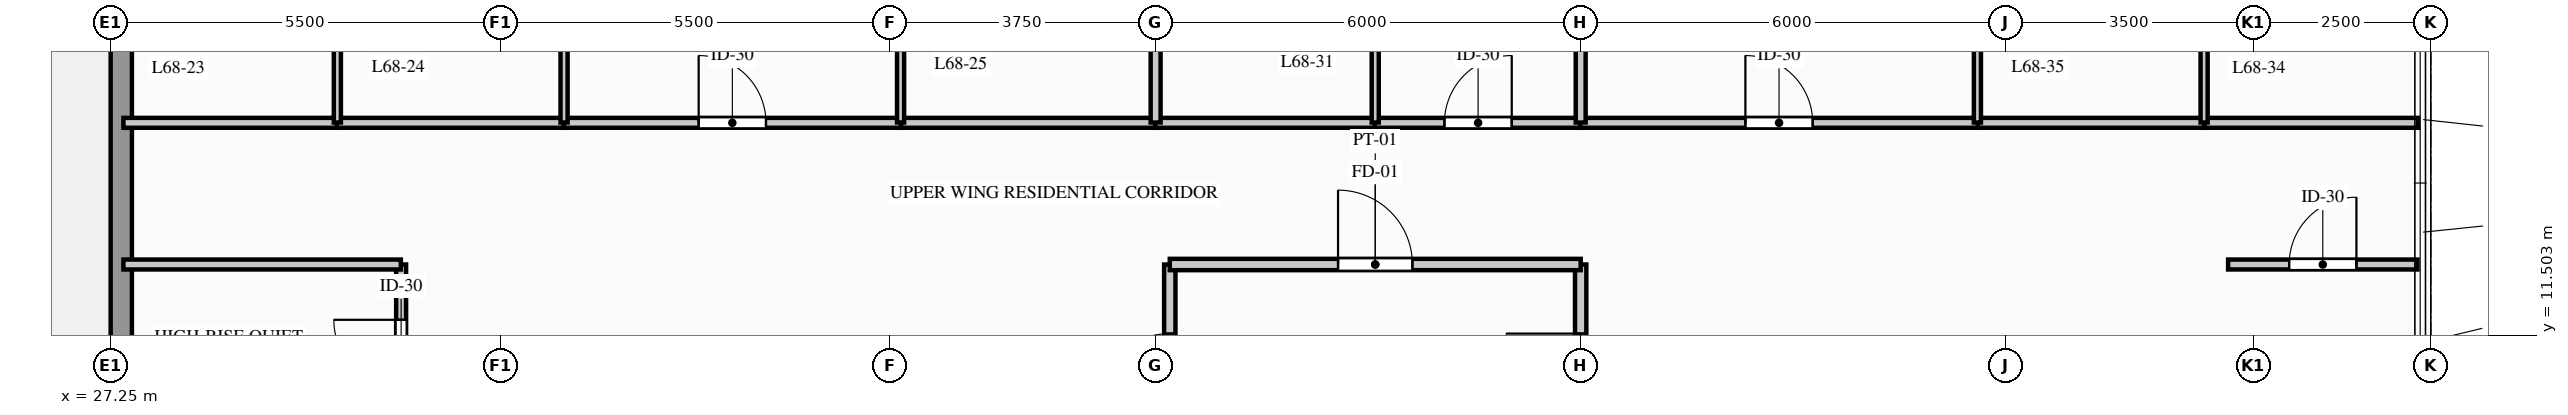
"""IFC4 building model, lengths in metres.
Left out: names, types, materials, properties, quantities, classifications, styles, units other than length and angle.
Written with IfcOpenShell. Run it as: python <this file> out.ifc"""

import sys

from ifc_helpers import new_model, si_unit, direction, frame, frame_2d, origin, place, context, subcontext, project, spatial, rectangle, extrude, element, fill, save


model = new_model("IFC4")
c1 = context("Model", 3, precision=1e-05, world=origin(), true_north=direction((0.0, 1.0)))
c2 = subcontext(c1, "Body", "Model", "MODEL_VIEW")
j1 = project(units=[si_unit("LENGTHUNIT", "METRE"), si_unit("PLANEANGLEUNIT", "RADIAN")], contexts=[c1])
p1 = place(None, origin())
s1 = spatial("IfcSite", under=j1, at=p1, CompositionType="ELEMENT")
p2 = place(p1, origin())
s2 = spatial("IfcBuilding", under=s1, at=p2, CompositionType="ELEMENT")
p3 = place(p2, frame((0.0, 0.0, 224.2)))
s3 = spatial("IfcBuildingStorey", under=s2, at=p3, CompositionType="ELEMENT", Elevation=224.2)
p4 = place(p3, frame((27.4, 24.0, 0.0), z_axis=(0.0, 0.0, 1.0), x_axis=(0.0, -1.0, 0.0)))
e1 = element("IfcWall", 1, at=p4, inside=s3, PredefinedType="STANDARD", context=c2, shape_type="SweptSolid", body=[
    extrude(rectangle(XDim=21.5, YDim=0.3, at=frame_2d((10.75, 0.0))), origin(), (0.0, 0.0, 1.0), 2.332),
])
p5 = place(p4, frame((5.5, 0.0, 0.0)))
e2 = element("IfcOpeningElement", 2, at=p5, cuts=e1, PredefinedType="OPENING", context=c2, shape_type="SweptSolid", body=[
    extrude(rectangle(XDim=1.1, YDim=2.2, at=frame_2d((0.55, 1.1))), frame((0.0, 0.16, 0.0), z_axis=(0.0, -1.0, 0.0), x_axis=(1.0, 0.0, 0.0)), (0.0, 0.0, 1.0), 0.32),
])
p6 = place(p4, frame((2.43, 0.0, 0.312)))
e3 = element("IfcOpeningElement", 3, at=p6, cuts=e1, PredefinedType="OPENING", context=c2, shape_type="SweptSolid", body=[
    extrude(rectangle(XDim=1.5, YDim=1.8, at=frame_2d((0.75, 0.9))), frame((0.0, 0.16, 0.0), z_axis=(0.0, -1.0, 0.0), x_axis=(1.0, 0.0, 0.0)), (0.0, 0.0, 1.0), 0.32),
])
p7 = place(p3, frame((31.35, 9.989, 0.0), z_axis=(0.0, 0.0, 1.0), x_axis=(0.0, 1.0, 0.0)))
e4 = element("IfcWall", 4, at=p7, inside=s3, PredefinedType="PARTITIONING", context=c2, shape_type="SweptSolid", body=[
    extrude(rectangle(XDim=2.511, YDim=0.14, at=frame_2d((1.256, 0.0))), origin(), (0.0, 0.0, 1.0), 2.325),
])
p8 = place(p7, frame((0.781, 0.0, 0.0)))
e5 = element("IfcOpeningElement", 5, at=p8, cuts=e4, PredefinedType="OPENING", context=c2, shape_type="SweptSolid", body=[
    extrude(rectangle(XDim=0.95, YDim=2.05, at=frame_2d((0.475, 1.025))), frame((0.0, 0.08, 0.0), z_axis=(0.0, -1.0, 0.0), x_axis=(1.0, 0.0, 0.0)), (0.0, 0.0, 1.0), 0.16),
])
p9 = place(p3, frame((42.2, 9.5, 0.0), z_axis=(0.0, 0.0, 1.0), x_axis=(0.0, 1.0, 0.0)))
e6 = element("IfcWall", 6, at=p9, inside=s3, PredefinedType="PARTITIONING", context=c2, shape_type="SweptSolid", body=[
    extrude(rectangle(XDim=3.0, YDim=0.16, at=frame_2d((1.5, 0.0))), origin(), (0.0, 0.0, 1.0), 2.325),
])
p10 = place(p9, frame((0.975, 0.0, 0.0)))
e7 = element("IfcOpeningElement", 7, at=p10, cuts=e6, PredefinedType="OPENING", context=c2, shape_type="SweptSolid", body=[
    extrude(rectangle(XDim=1.05, YDim=2.06, at=frame_2d((0.525, 1.03))), frame((0.0, 0.09, 0.0), z_axis=(0.0, -1.0, 0.0), x_axis=(1.0, 0.0, 0.0)), (0.0, 0.0, 1.0), 0.18),
])
p11 = place(p3, frame((48.0, 9.5, 0.0), z_axis=(0.0, 0.0, 1.0), x_axis=(0.0, 1.0, 0.0)))
e8 = element("IfcWall", 8, at=p11, inside=s3, PredefinedType="PARTITIONING", context=c2, shape_type="SweptSolid", body=[
    extrude(rectangle(XDim=3.0, YDim=0.16, at=frame_2d((1.5, 0.0))), origin(), (0.0, 0.0, 1.0), 2.325),
])
p12 = place(p11, frame((0.975, 0.0, 0.0)))
e9 = element("IfcOpeningElement", 9, at=p12, cuts=e8, PredefinedType="OPENING", context=c2, shape_type="SweptSolid", body=[
    extrude(rectangle(XDim=1.05, YDim=2.06, at=frame_2d((0.525, 1.03))), frame((0.0, 0.09, 0.0), z_axis=(0.0, -1.0, 0.0), x_axis=(1.0, 0.0, 0.0)), (0.0, 0.0, 1.0), 0.18),
])
p13 = place(p3, frame((42.2, 12.5, 0.0), z_axis=(0.0, 0.0, 1.0), x_axis=(1.0, 0.0, 0.0)))
e10 = element("IfcWall", 10, at=p13, inside=s3, PredefinedType="PARTITIONING", context=c2, shape_type="SweptSolid", body=[
    extrude(rectangle(XDim=5.8, YDim=0.16, at=frame_2d((2.9, 0.0))), origin(), (0.0, 0.0, 1.0), 2.325),
])
p14 = place(p13, frame((2.375, 0.0, 0.0)))
e11 = element("IfcOpeningElement", 11, at=p14, cuts=e10, PredefinedType="OPENING", context=c2, shape_type="SweptSolid", body=[
    extrude(rectangle(XDim=1.05, YDim=2.06, at=frame_2d((0.525, 1.03))), frame((0.0, 0.09, 0.0), z_axis=(0.0, -1.0, 0.0), x_axis=(1.0, 0.0, 0.0)), (0.0, 0.0, 1.0), 0.18),
])
p15 = place(p3, frame((57.139, 12.5, 0.0), z_axis=(0.0, 0.0, 1.0), x_axis=(1.0, 0.0, 0.0)))
e12 = element("IfcWall", 12, at=p15, inside=s3, PredefinedType="PARTITIONING", context=c2, shape_type="SweptSolid", body=[
    extrude(rectangle(XDim=2.673, YDim=0.14, at=frame_2d((1.336, 0.0))), origin(), (0.0, 0.0, 1.0), 2.89),
])
p16 = place(p15, frame((0.861, 0.0, 0.0)))
e13 = element("IfcOpeningElement", 13, at=p16, cuts=e12, PredefinedType="OPENING", context=c2, shape_type="SweptSolid", body=[
    extrude(rectangle(XDim=0.95, YDim=2.05, at=frame_2d((0.475, 1.025))), frame((0.0, 0.08, 0.0), z_axis=(0.0, -1.0, 0.0), x_axis=(1.0, 0.0, 0.0)), (0.0, 0.0, 1.0), 0.16),
])
p17 = place(p3, frame((27.43, 12.5, 0.0), z_axis=(0.0, 0.0, 1.0), x_axis=(1.0, 0.0, 0.0)))
e14 = element("IfcWall", 14, at=p17, inside=s3, PredefinedType="PARTITIONING", context=c2, shape_type="SweptSolid", body=[
    extrude(rectangle(XDim=3.916, YDim=0.14, at=frame_2d((1.958, 0.0))), origin(), (0.0, 0.0, 1.0), 2.89),
])
p18 = place(p3, frame((27.43, 14.5, 0.0), z_axis=(0.0, 0.0, 1.0), x_axis=(1.0, 0.0, 0.0)))
e15 = element("IfcWall", 15, at=p18, inside=s3, PredefinedType="PARTITIONING", context=c2, shape_type="SweptSolid", body=[
    extrude(rectangle(XDim=3.031, YDim=0.14, at=frame_2d((1.516, 0.0))), origin(), (0.0, 0.0, 1.0), 2.89),
])
p19 = place(p3, frame((30.443, 14.5, 0.0), z_axis=(0.0, 0.0, 1.0), x_axis=(1.0, 0.0, 0.0)))
e16 = element("IfcWall", 16, at=p19, inside=s3, PredefinedType="PARTITIONING", context=c2, shape_type="SweptSolid", body=[
    extrude(rectangle(XDim=3.219, YDim=0.14, at=frame_2d((1.609, 0.0))), origin(), (0.0, 0.0, 1.0), 2.89),
])
p20 = place(p3, frame((38.389, 14.5, 0.0), z_axis=(0.0, 0.0, 1.0), x_axis=(1.0, 0.0, 0.0)))
e17 = element("IfcWall", 17, at=p20, inside=s3, PredefinedType="PARTITIONING", context=c2, shape_type="SweptSolid", body=[
    extrude(rectangle(XDim=3.623, YDim=0.14, at=frame_2d((1.811, 0.0))), origin(), (0.0, 0.0, 1.0), 2.325),
])
p21 = place(p3, frame((33.643, 14.5, 0.0), z_axis=(0.0, 0.0, 1.0), x_axis=(1.0, 0.0, 0.0)))
e18 = element("IfcWall", 18, at=p21, inside=s3, PredefinedType="PARTITIONING", context=c2, shape_type="SweptSolid", body=[
    extrude(rectangle(XDim=4.765, YDim=0.14, at=frame_2d((2.382, 0.0))), origin(), (0.0, 0.0, 1.0), 2.325),
])
p22 = place(p21, frame((1.907, 0.0, 0.0)))
e19 = element("IfcOpeningElement", 19, at=p22, cuts=e18, PredefinedType="OPENING", context=c2, shape_type="SweptSolid", body=[
    extrude(rectangle(XDim=0.95, YDim=2.05, at=frame_2d((0.475, 1.025))), frame((0.0, 0.08, 0.0), z_axis=(0.0, -1.0, 0.0), x_axis=(1.0, 0.0, 0.0)), (0.0, 0.0, 1.0), 0.16),
])
p23 = place(p3, frame((41.993, 14.5, 0.0), z_axis=(0.0, 0.0, 1.0), x_axis=(1.0, 0.0, 0.0)))
e20 = element("IfcWall", 20, at=p23, inside=s3, PredefinedType="PARTITIONING", context=c2, shape_type="SweptSolid", body=[
    extrude(rectangle(XDim=3.119, YDim=0.14, at=frame_2d((1.559, 0.0))), origin(), (0.0, 0.0, 1.0), 2.325),
])
p24 = place(p3, frame((45.093, 14.5, 0.0), z_axis=(0.0, 0.0, 1.0), x_axis=(1.0, 0.0, 0.0)))
e21 = element("IfcWall", 21, at=p24, inside=s3, PredefinedType="PARTITIONING", context=c2, shape_type="SweptSolid", body=[
    extrude(rectangle(XDim=2.918, YDim=0.14, at=frame_2d((1.459, 0.0))), origin(), (0.0, 0.0, 1.0), 2.325),
])
p25 = place(p24, frame((0.984, 0.0, 0.0)))
e22 = element("IfcOpeningElement", 22, at=p25, cuts=e21, PredefinedType="OPENING", context=c2, shape_type="SweptSolid", body=[
    extrude(rectangle(XDim=0.95, YDim=2.05, at=frame_2d((0.475, 1.025))), frame((0.0, 0.08, 0.0), z_axis=(0.0, -1.0, 0.0), x_axis=(1.0, 0.0, 0.0)), (0.0, 0.0, 1.0), 0.16),
])
p26 = place(p3, frame((56.789, 14.5, 0.0), z_axis=(0.0, 0.0, 1.0), x_axis=(1.0, 0.0, 0.0)))
e23 = element("IfcWall", 23, at=p26, inside=s3, PredefinedType="PARTITIONING", context=c2, shape_type="SweptSolid", body=[
    extrude(rectangle(XDim=3.031, YDim=0.14, at=frame_2d((1.516, 0.0))), origin(), (0.0, 0.0, 1.0), 2.89),
])
p27 = place(p3, frame((53.589, 14.5, 0.0), z_axis=(0.0, 0.0, 1.0), x_axis=(1.0, 0.0, 0.0)))
e24 = element("IfcWall", 24, at=p27, inside=s3, PredefinedType="PARTITIONING", context=c2, shape_type="SweptSolid", body=[
    extrude(rectangle(XDim=3.219, YDim=0.14, at=frame_2d((1.609, 0.0))), origin(), (0.0, 0.0, 1.0), 2.325),
])
p28 = place(p3, frame((47.993, 14.5, 0.0), z_axis=(0.0, 0.0, 1.0), x_axis=(1.0, 0.0, 0.0)))
e25 = element("IfcWall", 25, at=p28, inside=s3, PredefinedType="PARTITIONING", context=c2, shape_type="SweptSolid", body=[
    extrude(rectangle(XDim=5.615, YDim=0.14, at=frame_2d((2.807, 0.0))), origin(), (0.0, 0.0, 1.0), 2.325),
])
p29 = place(p28, frame((2.332, 0.0, 0.0)))
e26 = element("IfcOpeningElement", 26, at=p29, cuts=e25, PredefinedType="OPENING", context=c2, shape_type="SweptSolid", body=[
    extrude(rectangle(XDim=0.95, YDim=2.05, at=frame_2d((0.475, 1.025))), frame((0.0, 0.08, 0.0), z_axis=(0.0, -1.0, 0.0), x_axis=(1.0, 0.0, 0.0)), (0.0, 0.0, 1.0), 0.16),
])
for number, where, z_axis, x_axis in (
    (27, (30.45, 14.504, 0.0), (0.0, 0.0, 1.0), (0.0, 1.0, 0.0)),
    (28, (33.65, 14.504, 0.0), (0.0, 0.0, 1.0), (0.0, 1.0, 0.0)),
    (29, (38.4, 14.504, 0.0), (0.0, 0.0, 1.0), (0.0, 1.0, 0.0)),
):
    element("IfcWall", number, at=place(p3, frame(where, z_axis=z_axis, x_axis=x_axis)), inside=s3, PredefinedType="PARTITIONING", context=c2, shape_type="SweptSolid", body=[
        extrude(rectangle(XDim=2.346, YDim=0.1, at=frame_2d((1.173, 0.0))), origin(), (0.0, 0.0, 1.0), 2.325),
    ])
p30 = place(p3, frame((42.0, 14.504, 0.0), z_axis=(0.0, 0.0, 1.0), x_axis=(0.0, 1.0, 0.0)))
e30 = element("IfcWall", 30, at=p30, inside=s3, PredefinedType="PARTITIONING", context=c2, shape_type="SweptSolid", body=[
    extrude(rectangle(XDim=2.346, YDim=0.14, at=frame_2d((1.173, 0.0))), origin(), (0.0, 0.0, 1.0), 2.325),
])
p31 = place(p3, frame((45.1, 14.504, 0.0), z_axis=(0.0, 0.0, 1.0), x_axis=(0.0, 1.0, 0.0)))
e31 = element("IfcWall", 31, at=p31, inside=s3, PredefinedType="PARTITIONING", context=c2, shape_type="SweptSolid", body=[
    extrude(rectangle(XDim=2.546, YDim=0.1, at=frame_2d((1.273, 0.0))), origin(), (0.0, 0.0, 1.0), 2.325),
])
p32 = place(p3, frame((48.0, 14.504, 0.0), z_axis=(0.0, 0.0, 1.0), x_axis=(0.0, 1.0, 0.0)))
e32 = element("IfcWall", 32, at=p32, inside=s3, PredefinedType="PARTITIONING", context=c2, shape_type="SweptSolid", body=[
    extrude(rectangle(XDim=7.253, YDim=0.14, at=frame_2d((3.627, 0.0))), origin(), (0.0, 0.0, 1.0), 2.325),
])
for number, where, z_axis, x_axis in (
    (33, (56.8, 14.504, 0.0), (0.0, 0.0, 1.0), (0.0, 1.0, 0.0)),
    (34, (53.6, 14.504, 0.0), (0.0, 0.0, 1.0), (0.0, 1.0, 0.0)),
):
    element("IfcWall", number, at=place(p3, frame(where, z_axis=z_axis, x_axis=x_axis)), inside=s3, PredefinedType="PARTITIONING", context=c2, shape_type="SweptSolid", body=[
        extrude(rectangle(XDim=2.346, YDim=0.1, at=frame_2d((1.173, 0.0))), origin(), (0.0, 0.0, 1.0), 2.325),
    ])
p33 = place(p8, origin())
e35 = element("IfcDoor", 35, at=p33, inside=s3, OperationType="SINGLE_SWING_RIGHT", PredefinedType="DOOR", context=c2, shape_type="SweptSolid", body=[
    extrude(rectangle(XDim=0.95, YDim=2.05, at=frame_2d((0.475, 1.025))), frame((0.0, 0.025, 0.0), z_axis=(0.0, -1.0, 0.0), x_axis=(1.0, 0.0, 0.0)), (0.0, 0.0, 1.0), 0.05),
])
fill(e5, e35)
p34 = place(p10, origin())
e36 = element("IfcDoor", 36, at=p34, inside=s3, OperationType="SINGLE_SWING_LEFT", PredefinedType="DOOR", context=c2, shape_type="SweptSolid", body=[
    extrude(rectangle(XDim=1.05, YDim=2.06, at=frame_2d((0.525, 1.03))), frame((0.0, 0.025, 0.0), z_axis=(0.0, -1.0, 0.0), x_axis=(1.0, 0.0, 0.0)), (0.0, 0.0, 1.0), 0.05),
])
fill(e7, e36)
p35 = place(p12, origin())
e37 = element("IfcDoor", 37, at=p35, inside=s3, OperationType="SINGLE_SWING_RIGHT", PredefinedType="DOOR", context=c2, shape_type="SweptSolid", body=[
    extrude(rectangle(XDim=1.05, YDim=2.06, at=frame_2d((0.525, 1.03))), frame((0.0, 0.025, 0.0), z_axis=(0.0, -1.0, 0.0), x_axis=(1.0, 0.0, 0.0)), (0.0, 0.0, 1.0), 0.05),
])
fill(e9, e37)
p36 = place(p14, origin())
e38 = element("IfcDoor", 38, at=p36, inside=s3, OperationType="SINGLE_SWING_LEFT", PredefinedType="DOOR", context=c2, shape_type="SweptSolid", body=[
    extrude(rectangle(XDim=1.05, YDim=2.06, at=frame_2d((0.525, 1.03))), frame((0.0, 0.025, 0.0), z_axis=(0.0, -1.0, 0.0), x_axis=(1.0, 0.0, 0.0)), (0.0, 0.0, 1.0), 0.05),
])
fill(e11, e38)
p37 = place(p16, origin())
e39 = element("IfcDoor", 39, at=p37, inside=s3, OperationType="SINGLE_SWING_RIGHT", PredefinedType="DOOR", context=c2, shape_type="SweptSolid", body=[
    extrude(rectangle(XDim=0.95, YDim=2.05, at=frame_2d((0.475, 1.025))), frame((0.0, 0.025, 0.0), z_axis=(0.0, -1.0, 0.0), x_axis=(1.0, 0.0, 0.0)), (0.0, 0.0, 1.0), 0.05),
])
fill(e13, e39)
p38 = place(p22, origin())
e40 = element("IfcDoor", 40, at=p38, inside=s3, OperationType="SINGLE_SWING_LEFT", PredefinedType="DOOR", context=c2, shape_type="SweptSolid", body=[
    extrude(rectangle(XDim=0.95, YDim=2.05, at=frame_2d((0.475, 1.025))), frame((0.0, 0.025, 0.0), z_axis=(0.0, -1.0, 0.0), x_axis=(1.0, 0.0, 0.0)), (0.0, 0.0, 1.0), 0.05),
])
fill(e19, e40)
p39 = place(p25, origin())
e41 = element("IfcDoor", 41, at=p39, inside=s3, OperationType="SINGLE_SWING_RIGHT", PredefinedType="DOOR", context=c2, shape_type="SweptSolid", body=[
    extrude(rectangle(XDim=0.95, YDim=2.05, at=frame_2d((0.475, 1.025))), frame((0.0, 0.025, 0.0), z_axis=(0.0, -1.0, 0.0), x_axis=(1.0, 0.0, 0.0)), (0.0, 0.0, 1.0), 0.05),
])
fill(e22, e41)
p40 = place(p29, origin())
e42 = element("IfcDoor", 42, at=p40, inside=s3, OperationType="SINGLE_SWING_LEFT", PredefinedType="DOOR", context=c2, shape_type="SweptSolid", body=[
    extrude(rectangle(XDim=0.95, YDim=2.05, at=frame_2d((0.475, 1.025))), frame((0.0, 0.025, 0.0), z_axis=(0.0, -1.0, 0.0), x_axis=(1.0, 0.0, 0.0)), (0.0, 0.0, 1.0), 0.05),
])
fill(e26, e42)
save(model, sys.argv[1])
